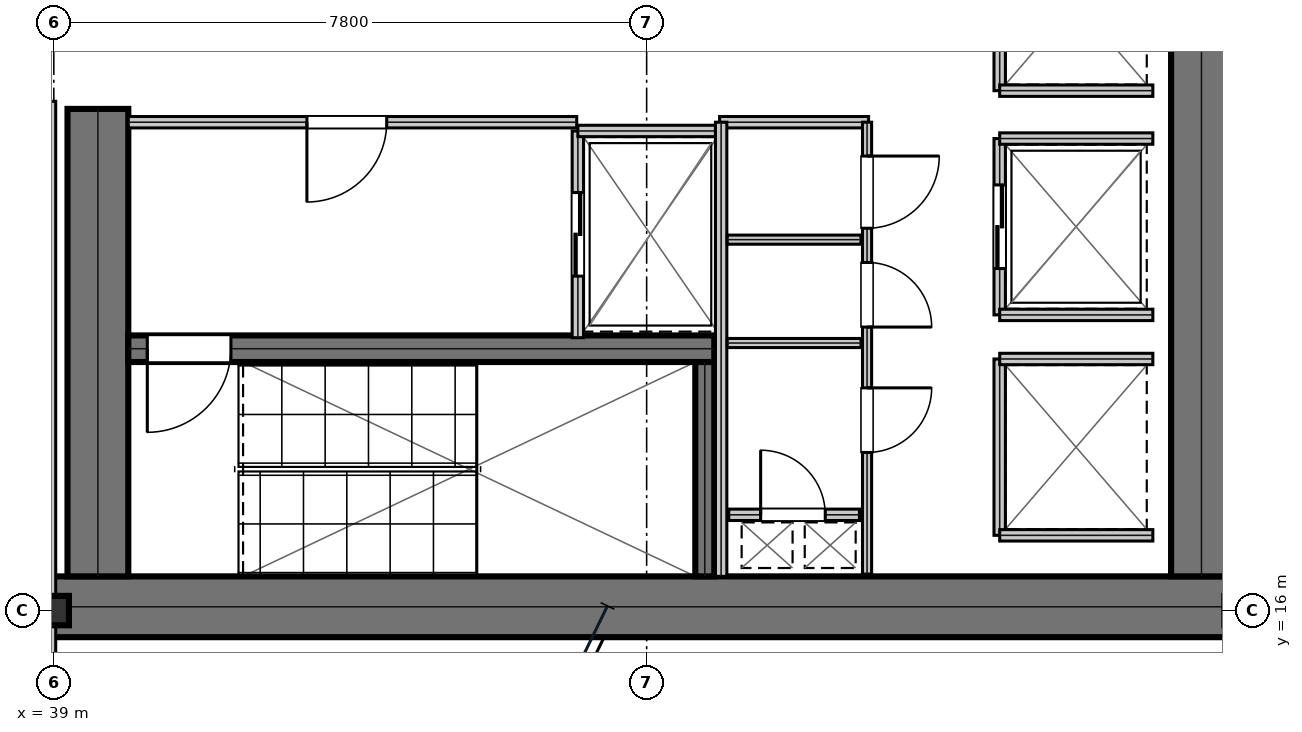
"""IFC4 building model, lengths in metres.
Left out: names, types, materials, properties, quantities, classifications, styles, units other than length and angle.
Written with IfcOpenShell. Run it as: python <this file> out.ifc"""

import sys

from ifc_helpers import new_model, si_unit, direction, frame, frame_2d, origin, origin_2d, place, context, subcontext, project, spatial, rectangle, i_section, extrude, element, fill, save


model = new_model("IFC4")
c1 = context("Model", 3, precision=1e-05, world=origin(), true_north=direction((0.0, 1.0)))
c2 = subcontext(c1, "Body", "Model", "MODEL_VIEW")
j1 = project(units=[si_unit("LENGTHUNIT", "METRE"), si_unit("PLANEANGLEUNIT", "RADIAN")], contexts=[c1])
p1 = place(None, origin())
s1 = spatial("IfcSite", under=j1, at=p1, CompositionType="ELEMENT")
p2 = place(p1, origin())
s2 = spatial("IfcBuilding", under=s1, at=p2, CompositionType="ELEMENT")
p3 = place(p2, frame((0.0, 0.0, 116.85)))
s3 = spatial("IfcBuildingStorey", under=s2, at=p3, CompositionType="ELEMENT", Elevation=116.85)
p4 = place(p3, frame((38.8, 16.05, 0.0), z_axis=(0.0, 0.0, 1.0), x_axis=(1.0, 0.0, 0.0)))
e1 = element("IfcWall", 1, at=p4, inside=s3, PredefinedType="SHEAR", context=c2, shape_type="SweptSolid", body=[
    extrude(rectangle(XDim=16.0, YDim=0.8, at=frame_2d((8.0, 0.0))), origin(), (0.0, 0.0, 1.0), 3.81),
])
p5 = place(p3, frame((39.58, 16.45, 0.0), z_axis=(0.0, 0.0, 1.0), x_axis=(0.0, 1.0, 0.0)))
e2 = element("IfcWall", 2, at=p5, inside=s3, PredefinedType="SHEAR", context=c2, shape_type="SweptSolid", body=[
    extrude(rectangle(XDim=6.15, YDim=0.8, at=frame_2d((3.075, 0.0))), origin(), (0.0, 0.0, 1.0), 3.81),
])
p6 = place(p3, frame((54.1, 16.45, 0.0), z_axis=(0.0, 0.0, 1.0), x_axis=(0.0, 1.0, 0.0)))
e3 = element("IfcWall", 3, at=p6, inside=s3, PredefinedType="SHEAR", context=c2, shape_type="SweptSolid", body=[
    extrude(rectangle(XDim=15.1, YDim=0.8, at=frame_2d((7.55, 0.0))), origin(), (0.0, 0.0, 1.0), 3.81),
])
p7 = place(p3, frame((39.98, 19.445, 0.0), z_axis=(0.0, 0.0, 1.0), x_axis=(1.0, 0.0, 0.0)))
e4 = element("IfcWall", 4, at=p7, inside=s3, PredefinedType="SHEAR", context=c2, shape_type="SweptSolid", body=[
    extrude(rectangle(XDim=7.71, YDim=0.35, at=frame_2d((3.855, 0.0))), origin(), (0.0, 0.0, 1.0), 3.81),
])
p8 = place(p7, frame((0.25, 0.0, 0.0)))
e5 = element("IfcOpeningElement", 5, at=p8, cuts=e4, PredefinedType="OPENING", context=c2, shape_type="SweptSolid", body=[
    extrude(rectangle(XDim=1.1, YDim=2.15, at=frame_2d((0.55, 1.075))), frame((0.0, 0.185, 0.0), z_axis=(0.0, -1.0, 0.0), x_axis=(1.0, 0.0, 0.0)), (0.0, 0.0, 1.0), 0.37),
])
p9 = place(p3, frame((47.565, 16.45, 0.0), z_axis=(0.0, 0.0, 1.0), x_axis=(0.0, 1.0, 0.0)))
e6 = element("IfcWall", 6, at=p9, inside=s3, PredefinedType="SHEAR", context=c2, shape_type="SweptSolid", body=[
    extrude(rectangle(XDim=2.82, YDim=0.25, at=frame_2d((1.41, 0.0))), origin(), (0.0, 0.0, 1.0), 3.81),
])
p10 = place(p3, frame((39.0, 16.0, 0.0), z_axis=(0.0, 0.0, 1.0), x_axis=(1.0, 0.0, 0.0)))
e7 = element("IfcColumn", 7, at=p10, inside=s3, PredefinedType="COLUMN", context=c2, shape_type="SweptSolid", body=[
    extrude(i_section(OverallWidth=0.398, OverallDepth=0.387, WebThickness=0.021, FlangeThickness=0.033, at=origin_2d()), origin(), (0.0, 0.0, 1.0), 4.044),
])
p11 = place(p3, frame((39.98, 22.425, 0.0), z_axis=(0.0, 0.0, 1.0), x_axis=(1.0, 0.0, 0.0)))
e8 = element("IfcWall", 8, at=p11, inside=s3, PredefinedType="PARTITIONING", context=c2, shape_type="SweptSolid", body=[
    extrude(rectangle(XDim=5.9, YDim=0.15, at=frame_2d((2.95, 0.0))), origin(), (0.0, 0.0, 1.0), 3.81),
])
p12 = place(p11, frame((2.35, 0.0, 0.0)))
e9 = element("IfcOpeningElement", 9, at=p12, cuts=e8, PredefinedType="OPENING", context=c2, shape_type="SweptSolid", body=[
    extrude(rectangle(XDim=1.05, YDim=2.15, at=frame_2d((0.525, 1.075))), frame((0.0, 0.085, 0.0), z_axis=(0.0, -1.0, 0.0), x_axis=(1.0, 0.0, 0.0)), (0.0, 0.0, 1.0), 0.17),
])
p13 = place(p3, frame((45.895, 19.59, 0.0), z_axis=(0.0, 0.0, 1.0), x_axis=(0.0, 1.0, 0.0)))
e10 = element("IfcWall", 10, at=p13, inside=s3, PredefinedType="PARTITIONING", context=c2, shape_type="SweptSolid", body=[
    extrude(rectangle(XDim=2.72, YDim=0.15, at=frame_2d((1.36, 0.0))), origin(), (0.0, 0.0, 1.0), 3.81),
])
p14 = place(p13, frame((0.81, 0.0, 0.0)))
e11 = element("IfcOpeningElement", 11, at=p14, cuts=e10, PredefinedType="OPENING", context=c2, shape_type="SweptSolid", body=[
    extrude(rectangle(XDim=1.1, YDim=2.15, at=frame_2d((0.55, 1.075))), frame((0.0, 0.085, 0.0), z_axis=(0.0, -1.0, 0.0), x_axis=(1.0, 0.0, 0.0)), (0.0, 0.0, 1.0), 0.17),
])
p15 = place(p3, frame((45.895, 22.31, 0.0), z_axis=(0.0, 0.0, 1.0), x_axis=(1.0, 0.0, 0.0)))
e12 = element("IfcWall", 12, at=p15, inside=s3, PredefinedType="PARTITIONING", context=c2, shape_type="SweptSolid", body=[
    extrude(rectangle(XDim=1.915, YDim=0.15, at=frame_2d((0.958, 0.0))), origin(), (0.0, 0.0, 1.0), 3.81),
])
p16 = place(p3, frame((51.445, 19.89, 0.0), z_axis=(0.0, 0.0, 1.0), x_axis=(0.0, 1.0, 0.0)))
e13 = element("IfcWall", 13, at=p16, inside=s3, PredefinedType="PARTITIONING", context=c2, shape_type="SweptSolid", body=[
    extrude(rectangle(XDim=2.32, YDim=0.15, at=frame_2d((1.16, 0.0))), origin(), (0.0, 0.0, 1.0), 3.81),
])
p17 = place(p16, frame((0.61, 0.0, 0.0)))
e14 = element("IfcOpeningElement", 14, at=p17, cuts=e13, PredefinedType="OPENING", context=c2, shape_type="SweptSolid", body=[
    extrude(rectangle(XDim=1.1, YDim=2.15, at=frame_2d((0.55, 1.075))), frame((0.0, 0.085, 0.0), z_axis=(0.0, -1.0, 0.0), x_axis=(1.0, 0.0, 0.0)), (0.0, 0.0, 1.0), 0.17),
])
for number, where, z_axis, x_axis in (
    (15, (51.445, 19.89, 0.0), (0.0, 0.0, 1.0), (1.0, 0.0, 0.0)),
    (16, (51.445, 22.21, 0.0), (0.0, 0.0, 1.0), (1.0, 0.0, 0.0)),
):
    element("IfcWall", number, at=place(p3, frame(where, z_axis=z_axis, x_axis=x_axis)), inside=s3, PredefinedType="PARTITIONING", context=c2, shape_type="SweptSolid", body=[
        extrude(rectangle(XDim=2.015, YDim=0.15, at=frame_2d((1.007, 0.0))), origin(), (0.0, 0.0, 1.0), 3.81),
    ])
p18 = place(p3, frame((51.445, 22.84, 0.0), z_axis=(0.0, 0.0, 1.0), x_axis=(0.0, 1.0, 0.0)))
e17 = element("IfcWall", 17, at=p18, inside=s3, PredefinedType="PARTITIONING", context=c2, shape_type="SweptSolid", body=[
    extrude(rectangle(XDim=2.32, YDim=0.15, at=frame_2d((1.16, 0.0))), origin(), (0.0, 0.0, 1.0), 3.81),
])
p19 = place(p3, frame((51.445, 22.84, 0.0), z_axis=(0.0, 0.0, 1.0), x_axis=(1.0, 0.0, 0.0)))
e18 = element("IfcWall", 18, at=p19, inside=s3, PredefinedType="PARTITIONING", context=c2, shape_type="SweptSolid", body=[
    extrude(rectangle(XDim=2.015, YDim=0.15, at=frame_2d((1.007, 0.0))), origin(), (0.0, 0.0, 1.0), 3.81),
])
p20 = place(p3, frame((51.445, 16.99, 0.0), z_axis=(0.0, 0.0, 1.0), x_axis=(0.0, 1.0, 0.0)))
e19 = element("IfcWall", 19, at=p20, inside=s3, PredefinedType="PARTITIONING", context=c2, shape_type="SweptSolid", body=[
    extrude(rectangle(XDim=2.32, YDim=0.15, at=frame_2d((1.16, 0.0))), origin(), (0.0, 0.0, 1.0), 3.81),
])
for number, where, z_axis, x_axis in (
    (20, (51.445, 16.99, 0.0), (0.0, 0.0, 1.0), (1.0, 0.0, 0.0)),
    (21, (51.445, 19.31, 0.0), (0.0, 0.0, 1.0), (1.0, 0.0, 0.0)),
):
    element("IfcWall", number, at=place(p3, frame(where, z_axis=z_axis, x_axis=x_axis)), inside=s3, PredefinedType="PARTITIONING", context=c2, shape_type="SweptSolid", body=[
        extrude(rectangle(XDim=2.015, YDim=0.15, at=frame_2d((1.007, 0.0))), origin(), (0.0, 0.0, 1.0), 3.81),
    ])
p21 = place(p3, frame((47.88, 17.26, 0.0), z_axis=(0.0, 0.0, 1.0), x_axis=(1.0, 0.0, 0.0)))
e22 = element("IfcWall", 22, at=p21, inside=s3, PredefinedType="PARTITIONING", context=c2, shape_type="SweptSolid", body=[
    extrude(rectangle(XDim=1.72, YDim=0.15, at=frame_2d((0.86, 0.0))), origin(), (0.0, 0.0, 1.0), 3.81),
])
p22 = place(p21, frame((0.42, 0.0, 0.0)))
e23 = element("IfcOpeningElement", 23, at=p22, cuts=e22, PredefinedType="OPENING", context=c2, shape_type="SweptSolid", body=[
    extrude(rectangle(XDim=0.85, YDim=2.15, at=frame_2d((0.425, 1.075))), frame((0.0, 0.085, 0.0), z_axis=(0.0, -1.0, 0.0), x_axis=(1.0, 0.0, 0.0)), (0.0, 0.0, 1.0), 0.17),
])
p23 = place(p3, frame((47.76, 22.425, 0.0), z_axis=(0.0, 0.0, 1.0), x_axis=(1.0, 0.0, 0.0)))
e24 = element("IfcWall", 24, at=p23, inside=s3, PredefinedType="PARTITIONING", context=c2, shape_type="SweptSolid", body=[
    extrude(rectangle(XDim=1.96, YDim=0.15, at=frame_2d((0.98, 0.0))), origin(), (0.0, 0.0, 1.0), 3.81),
])
p24 = place(p3, frame((47.78, 16.45, 0.0), z_axis=(0.0, 0.0, 1.0), x_axis=(0.0, 1.0, 0.0)))
e25 = element("IfcWall", 25, at=p24, inside=s3, PredefinedType="PARTITIONING", context=c2, shape_type="SweptSolid", body=[
    extrude(rectangle(XDim=5.975, YDim=0.15, at=frame_2d((2.988, 0.0))), origin(), (0.0, 0.0, 1.0), 3.81),
])
for number, where, z_axis, x_axis in (
    (26, (47.86, 19.52, 0.0), (0.0, 0.0, 1.0), (1.0, 0.0, 0.0)),
    (27, (47.86, 20.88, 0.0), (0.0, 0.0, 1.0), (1.0, 0.0, 0.0)),
):
    element("IfcWall", number, at=place(p3, frame(where, z_axis=z_axis, x_axis=x_axis)), inside=s3, PredefinedType="PARTITIONING", context=c2, shape_type="SweptSolid", body=[
        extrude(rectangle(XDim=1.76, YDim=0.12, at=frame_2d((0.88, 0.0))), origin(), (0.0, 0.0, 1.0), 3.81),
    ])
p25 = place(p3, frame((49.7, 16.48, 0.0), z_axis=(0.0, 0.0, 1.0), x_axis=(0.0, 1.0, 0.0)))
e28 = element("IfcWall", 28, at=p25, inside=s3, PredefinedType="PARTITIONING", context=c2, shape_type="SweptSolid", body=[
    extrude(rectangle(XDim=5.945, YDim=0.12, at=frame_2d((2.973, 0.0))), origin(), (0.0, 0.0, 1.0), 3.81),
])
p26 = place(p25, frame((1.6, 0.0, 0.0)))
e29 = element("IfcOpeningElement", 29, at=p26, cuts=e28, PredefinedType="OPENING", context=c2, shape_type="SweptSolid", body=[
    extrude(rectangle(XDim=0.85, YDim=2.15, at=frame_2d((0.425, 1.075))), frame((0.0, 0.07, 0.0), z_axis=(0.0, -1.0, 0.0), x_axis=(1.0, 0.0, 0.0)), (0.0, 0.0, 1.0), 0.14),
])
p27 = place(p25, frame((3.25, 0.0, 0.0)))
e30 = element("IfcOpeningElement", 30, at=p27, cuts=e28, PredefinedType="OPENING", context=c2, shape_type="SweptSolid", body=[
    extrude(rectangle(XDim=0.85, YDim=2.15, at=frame_2d((0.425, 1.075))), frame((0.0, 0.07, 0.0), z_axis=(0.0, -1.0, 0.0), x_axis=(1.0, 0.0, 0.0)), (0.0, 0.0, 1.0), 0.14),
])
p28 = place(p25, frame((4.55, 0.0, 0.0)))
e31 = element("IfcOpeningElement", 31, at=p28, cuts=e28, PredefinedType="OPENING", context=c2, shape_type="SweptSolid", body=[
    extrude(rectangle(XDim=0.95, YDim=2.15, at=frame_2d((0.475, 1.075))), frame((0.0, 0.07, 0.0), z_axis=(0.0, -1.0, 0.0), x_axis=(1.0, 0.0, 0.0)), (0.0, 0.0, 1.0), 0.14),
])
p29 = place(p3, frame((38.95, 14.5, 0.0), z_axis=(0.0, 0.0, 1.0), x_axis=(0.0, 1.0, 0.0)))
e32 = element("IfcWall", 32, at=p29, inside=s3, PredefinedType="PARTITIONING", context=c2, shape_type="SweptSolid", body=[
    extrude(rectangle(XDim=8.2, YDim=0.15, at=frame_2d((4.1, 0.0))), origin(), (0.0, 0.0, 1.0), 3.19),
])
p30 = place(p12, frame((1.05, 0.0, 0.0), z_axis=(0.0, 0.0, 1.0), x_axis=(-1.0, 0.0, 0.0)))
e33 = element("IfcDoor", 33, at=p30, inside=s3, OperationType="SINGLE_SWING_RIGHT", PredefinedType="DOOR", context=c2, shape_type="SweptSolid", body=[
    extrude(rectangle(XDim=1.05, YDim=2.15, at=frame_2d((0.525, 1.075))), frame((0.0, 0.025, 0.0), z_axis=(0.0, -1.0, 0.0), x_axis=(1.0, 0.0, 0.0)), (0.0, 0.0, 1.0), 0.05),
])
fill(e9, e33)
p31 = place(p14, frame((1.1, 0.0, 0.0), z_axis=(0.0, 0.0, 1.0), x_axis=(-1.0, 0.0, 0.0)))
e34 = element("IfcDoor", 34, at=p31, inside=s3, OperationType="DOUBLE_DOOR_SLIDING", PredefinedType="DOOR", context=c2, shape_type="SweptSolid", body=[
    extrude(rectangle(XDim=1.1, YDim=2.15, at=frame_2d((0.55, 1.075))), frame((0.0, 0.025, 0.0), z_axis=(0.0, -1.0, 0.0), x_axis=(1.0, 0.0, 0.0)), (0.0, 0.0, 1.0), 0.05),
])
fill(e11, e34)
p32 = place(p17, frame((1.1, 0.0, 0.0), z_axis=(0.0, 0.0, 1.0), x_axis=(-1.0, 0.0, 0.0)))
e35 = element("IfcDoor", 35, at=p32, inside=s3, OperationType="DOUBLE_DOOR_SLIDING", PredefinedType="DOOR", context=c2, shape_type="SweptSolid", body=[
    extrude(rectangle(XDim=1.1, YDim=2.15, at=frame_2d((0.55, 1.075))), frame((0.0, 0.025, 0.0), z_axis=(0.0, -1.0, 0.0), x_axis=(1.0, 0.0, 0.0)), (0.0, 0.0, 1.0), 0.05),
])
fill(e14, e35)
p33 = place(p22, origin())
e36 = element("IfcDoor", 36, at=p33, inside=s3, OperationType="SINGLE_SWING_LEFT", PredefinedType="TRAPDOOR", context=c2, shape_type="SweptSolid", body=[
    extrude(rectangle(XDim=0.85, YDim=2.15, at=frame_2d((0.425, 1.075))), frame((0.0, 0.025, 0.0), z_axis=(0.0, -1.0, 0.0), x_axis=(1.0, 0.0, 0.0)), (0.0, 0.0, 1.0), 0.05),
])
fill(e23, e36)
p34 = place(p26, frame((0.85, 0.0, 0.0), z_axis=(0.0, 0.0, 1.0), x_axis=(-1.0, 0.0, 0.0)))
e37 = element("IfcDoor", 37, at=p34, inside=s3, OperationType="SINGLE_SWING_LEFT", PredefinedType="DOOR", context=c2, shape_type="SweptSolid", body=[
    extrude(rectangle(XDim=0.85, YDim=2.15, at=frame_2d((0.425, 1.075))), frame((0.0, 0.025, 0.0), z_axis=(0.0, -1.0, 0.0), x_axis=(1.0, 0.0, 0.0)), (0.0, 0.0, 1.0), 0.05),
])
fill(e29, e37)
p35 = place(p27, frame((0.85, 0.0, 0.0), z_axis=(0.0, 0.0, 1.0), x_axis=(-1.0, 0.0, 0.0)))
e38 = element("IfcDoor", 38, at=p35, inside=s3, OperationType="SINGLE_SWING_RIGHT", PredefinedType="DOOR", context=c2, shape_type="SweptSolid", body=[
    extrude(rectangle(XDim=0.85, YDim=2.15, at=frame_2d((0.425, 1.075))), frame((0.0, 0.025, 0.0), z_axis=(0.0, -1.0, 0.0), x_axis=(1.0, 0.0, 0.0)), (0.0, 0.0, 1.0), 0.05),
])
fill(e30, e38)
p36 = place(p28, frame((0.95, 0.0, 0.0), z_axis=(0.0, 0.0, 1.0), x_axis=(-1.0, 0.0, 0.0)))
e39 = element("IfcDoor", 39, at=p36, inside=s3, OperationType="SINGLE_SWING_LEFT", PredefinedType="DOOR", context=c2, shape_type="SweptSolid", body=[
    extrude(rectangle(XDim=0.95, YDim=2.15, at=frame_2d((0.475, 1.075))), frame((0.0, 0.025, 0.0), z_axis=(0.0, -1.0, 0.0), x_axis=(1.0, 0.0, 0.0)), (0.0, 0.0, 1.0), 0.05),
])
fill(e31, e39)
p37 = place(p8, frame((1.1, 0.0, 0.0), z_axis=(0.0, 0.0, 1.0), x_axis=(-1.0, 0.0, 0.0)))
e40 = element("IfcDoor", 40, at=p37, inside=s3, OperationType="SINGLE_SWING_RIGHT", PredefinedType="DOOR", context=c2, shape_type="SweptSolid", body=[
    extrude(rectangle(XDim=1.1, YDim=2.15, at=frame_2d((0.55, 1.075))), frame((0.0, 0.025, 0.0), z_axis=(0.0, -1.0, 0.0), x_axis=(1.0, 0.0, 0.0)), (0.0, 0.0, 1.0), 0.05),
])
fill(e5, e40)
save(model, sys.argv[1])
